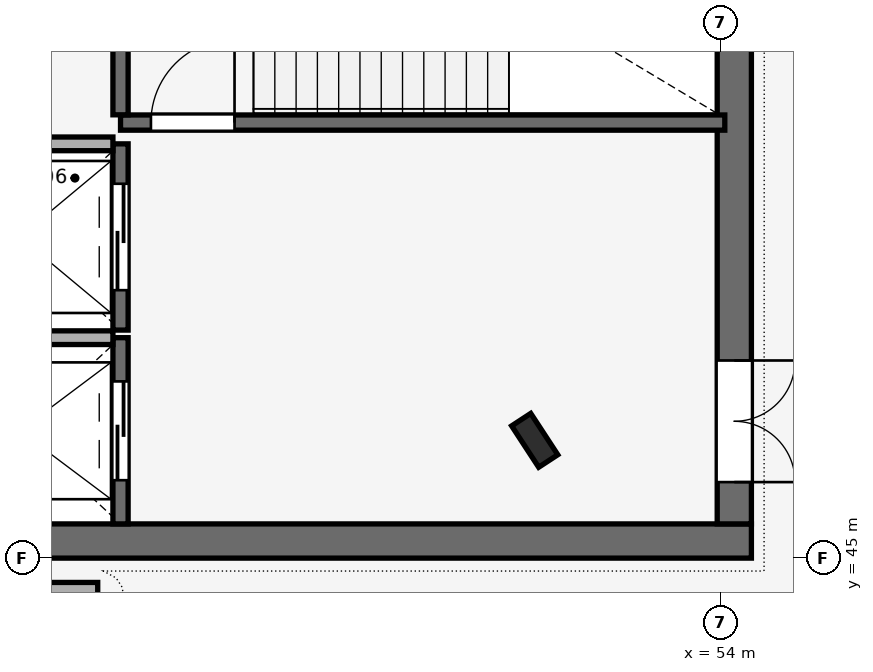
"""IFC4 building model, lengths in metres.
Left out: names, types, materials, properties, quantities, classifications, styles, units other than length and angle.
Written with IfcOpenShell. Run it as: python <this file> out.ifc"""

import sys

from ifc_helpers import new_model, si_unit, direction, frame, frame_2d, origin, origin_2d, place, context, subcontext, project, spatial, rectangle, i_section, extrude, element, fill, save


model = new_model("IFC4")
c1 = context("Model", 3, precision=1e-05, world=origin(), true_north=direction((0.0, 1.0)))
c2 = subcontext(c1, "Body", "Model", "MODEL_VIEW")
j1 = project(units=[si_unit("LENGTHUNIT", "METRE"), si_unit("PLANEANGLEUNIT", "RADIAN")], contexts=[c1])
p1 = place(None, origin())
s1 = spatial("IfcSite", under=j1, at=p1, CompositionType="ELEMENT")
p2 = place(p1, origin())
s2 = spatial("IfcBuilding", under=s1, at=p2, CompositionType="ELEMENT")
p3 = place(p2, frame((0.0, 0.0, 19.5)))
s3 = spatial("IfcBuildingStorey", under=s2, at=p3, CompositionType="ELEMENT", Elevation=19.5)
p4 = place(p3, frame((51.549, 46.55, 0.0), z_axis=(0.0, 0.0, 1.0), x_axis=(-0.836955398099, -0.547271104292, 0.0)))
e1 = element("IfcColumn", 1, at=p4, inside=s3, PredefinedType="COLUMN", context=c2, shape_type="SweptSolid", body=[
    extrude(i_section(OverallWidth=0.3, OverallDepth=0.65, WebThickness=0.016, FlangeThickness=0.031, FilletRadius=0.027, at=origin_2d()), origin(), (0.0, 0.0, 1.0), 4.5),
])
p5 = place(p3, frame((43.0, 45.225, 0.0), z_axis=(0.0, 0.0, 1.0), x_axis=(1.0, 0.0, 0.0)))
e2 = element("IfcWall", 2, at=p5, inside=s3, PredefinedType="SHEAR", context=c2, shape_type="SweptSolid", body=[
    extrude(rectangle(XDim=11.4, YDim=0.45, at=frame_2d((5.7, 0.0))), origin(), (0.0, 0.0, 1.0), 4.5),
])
p6 = place(p3, frame((54.175, 45.45, 0.0), z_axis=(0.0, 0.0, 1.0), x_axis=(0.0, 1.0, 0.0)))
e3 = element("IfcWall", 3, at=p6, inside=s3, PredefinedType="SHEAR", context=c2, shape_type="SweptSolid", body=[
    extrude(rectangle(XDim=9.1, YDim=0.45, at=frame_2d((4.55, 0.0))), origin(), (0.0, 0.0, 1.0), 4.5),
])
p7 = place(p6, frame((0.55, 0.0, 0.0)))
e4 = element("IfcOpeningElement", 4, at=p7, cuts=e3, PredefinedType="OPENING", context=c2, shape_type="SweptSolid", body=[
    extrude(rectangle(XDim=1.6, YDim=2.2, at=frame_2d((0.8, 1.1))), frame((0.0, 0.235, 0.0), z_axis=(0.0, -1.0, 0.0), x_axis=(1.0, 0.0, 0.0)), (0.0, 0.0, 1.0), 0.47),
])
p8 = place(p3, frame((45.8, 44.5, 0.0), z_axis=(0.0, 0.0, 1.0), x_axis=(-1.0, 0.0, 0.0)))
e5 = element("IfcWall", 5, at=p8, inside=s3, PredefinedType="STANDARD", context=c2, shape_type="SweptSolid", body=[
    extrude(rectangle(XDim=3.3, YDim=0.36, at=frame_2d((1.65, 0.0))), origin(), (0.0, 0.0, 1.0), 4.25),
])
p9 = place(p3, frame((46.1, 45.45, 0.0), z_axis=(0.0, 0.0, 1.0), x_axis=(0.0, 1.0, 0.0)))
e6 = element("IfcWall", 6, at=p9, inside=s3, PredefinedType="SHEAR", context=c2, shape_type="SweptSolid", body=[
    extrude(rectangle(XDim=2.45, YDim=0.2, at=frame_2d((1.225, 0.0))), origin(), (0.0, 0.0, 1.0), 4.25),
])
p10 = place(p9, frame((0.575, 0.0, 0.0)))
e7 = element("IfcOpeningElement", 7, at=p10, cuts=e6, PredefinedType="OPENING", context=c2, shape_type="SweptSolid", body=[
    extrude(rectangle(XDim=1.3, YDim=2.2, at=frame_2d((0.65, 1.1))), frame((0.0, 0.11, 0.0), z_axis=(0.0, -1.0, 0.0), x_axis=(1.0, 0.0, 0.0)), (0.0, 0.0, 1.0), 0.22),
])
p11 = place(p3, frame((43.55, 47.9, 0.0), z_axis=(0.0, 0.0, 1.0), x_axis=(1.0, 0.0, 0.0)))
e8 = element("IfcWall", 8, at=p11, inside=s3, PredefinedType="PARTITIONING", context=c2, shape_type="SweptSolid", body=[
    extrude(rectangle(XDim=2.45, YDim=0.18, at=frame_2d((1.225, 0.0))), origin(), (0.0, 0.0, 1.0), 4.5),
])
p12 = place(p3, frame((46.1, 48.0, 0.0), z_axis=(0.0, 0.0, 1.0), x_axis=(0.0, 1.0, 0.0)))
e9 = element("IfcWall", 9, at=p12, inside=s3, PredefinedType="SHEAR", context=c2, shape_type="SweptSolid", body=[
    extrude(rectangle(XDim=2.45, YDim=0.2, at=frame_2d((1.225, 0.0))), origin(), (0.0, 0.0, 1.0), 4.25),
])
p13 = place(p12, frame((0.525, 0.0, 0.0)))
e10 = element("IfcOpeningElement", 10, at=p13, cuts=e9, PredefinedType="OPENING", context=c2, shape_type="SweptSolid", body=[
    extrude(rectangle(XDim=1.4, YDim=2.2, at=frame_2d((0.7, 1.1))), frame((0.0, 0.11, 0.0), z_axis=(0.0, -1.0, 0.0), x_axis=(1.0, 0.0, 0.0)), (0.0, 0.0, 1.0), 0.22),
])
p14 = place(p3, frame((43.55, 50.45, 0.0), z_axis=(0.0, 0.0, 1.0), x_axis=(1.0, 0.0, 0.0)))
e11 = element("IfcWall", 11, at=p14, inside=s3, PredefinedType="PARTITIONING", context=c2, shape_type="SweptSolid", body=[
    extrude(rectangle(XDim=2.45, YDim=0.18, at=frame_2d((1.225, 0.0))), origin(), (0.0, 0.0, 1.0), 4.5),
])
p15 = place(p3, frame((46.1, 50.73, 0.0), z_axis=(0.0, 0.0, 1.0), x_axis=(1.0, 0.0, 0.0)))
e12 = element("IfcWall", 12, at=p15, inside=s3, PredefinedType="SHEAR", context=c2, shape_type="SweptSolid", body=[
    extrude(rectangle(XDim=7.95, YDim=0.2, at=frame_2d((3.975, 0.0))), origin(), (0.0, 0.0, 1.0), 4.5),
])
p16 = place(p15, frame((0.4, 0.0, 0.0)))
e13 = element("IfcOpeningElement", 13, at=p16, cuts=e12, PredefinedType="OPENING", context=c2, shape_type="SweptSolid", body=[
    extrude(rectangle(XDim=1.1, YDim=2.15, at=frame_2d((0.55, 1.075))), frame((0.0, 0.11, 0.0), z_axis=(0.0, -1.0, 0.0), x_axis=(1.0, 0.0, 0.0)), (0.0, 0.0, 1.0), 0.22),
])
p17 = place(p3, frame((46.1, 50.832, 0.0), z_axis=(0.0, 0.0, 1.0), x_axis=(0.0, 1.0, 0.0)))
e14 = element("IfcWall", 14, at=p17, inside=s3, PredefinedType="SHEAR", context=c2, shape_type="SweptSolid", body=[
    extrude(rectangle(XDim=3.686, YDim=0.2, at=frame_2d((1.843, 0.0))), origin(), (0.0, 0.0, 1.0), 4.5),
])
p18 = place(p10, origin())
e15 = element("IfcDoor", 15, at=p18, inside=s3, OperationType="DOUBLE_DOOR_SLIDING", PredefinedType="DOOR", context=c2, shape_type="SweptSolid", body=[
    extrude(rectangle(XDim=1.3, YDim=2.2, at=frame_2d((0.65, 1.1))), frame((0.0, 0.025, 0.0), z_axis=(0.0, -1.0, 0.0), x_axis=(1.0, 0.0, 0.0)), (0.0, 0.0, 1.0), 0.05),
])
fill(e7, e15)
p19 = place(p13, origin())
e16 = element("IfcDoor", 16, at=p19, inside=s3, OperationType="DOUBLE_DOOR_SLIDING", PredefinedType="DOOR", context=c2, shape_type="SweptSolid", body=[
    extrude(rectangle(XDim=1.4, YDim=2.2, at=frame_2d((0.7, 1.1))), frame((0.0, 0.025, 0.0), z_axis=(0.0, -1.0, 0.0), x_axis=(1.0, 0.0, 0.0)), (0.0, 0.0, 1.0), 0.05),
])
fill(e10, e16)
p20 = place(p16, frame((1.1, 0.0, 0.0), z_axis=(0.0, 0.0, 1.0), x_axis=(-1.0, 0.0, 0.0)))
e17 = element("IfcDoor", 17, at=p20, inside=s3, OperationType="SINGLE_SWING_LEFT", PredefinedType="DOOR", context=c2, shape_type="SweptSolid", body=[
    extrude(rectangle(XDim=1.1, YDim=2.15, at=frame_2d((0.55, 1.075))), frame((0.0, 0.025, 0.0), z_axis=(0.0, -1.0, 0.0), x_axis=(1.0, 0.0, 0.0)), (0.0, 0.0, 1.0), 0.05),
])
fill(e13, e17)
p21 = place(p7, frame((1.6, 0.0, 0.0), z_axis=(0.0, 0.0, 1.0), x_axis=(-1.0, 0.0, 0.0)))
e18 = element("IfcDoor", 18, at=p21, inside=s3, OperationType="DOUBLE_DOOR_SINGLE_SWING", PredefinedType="DOOR", context=c2, shape_type="SweptSolid", body=[
    extrude(rectangle(XDim=1.6, YDim=2.2, at=frame_2d((0.8, 1.1))), frame((0.0, 0.025, 0.0), z_axis=(0.0, -1.0, 0.0), x_axis=(1.0, 0.0, 0.0)), (0.0, 0.0, 1.0), 0.05),
])
fill(e4, e18)
save(model, sys.argv[1])
